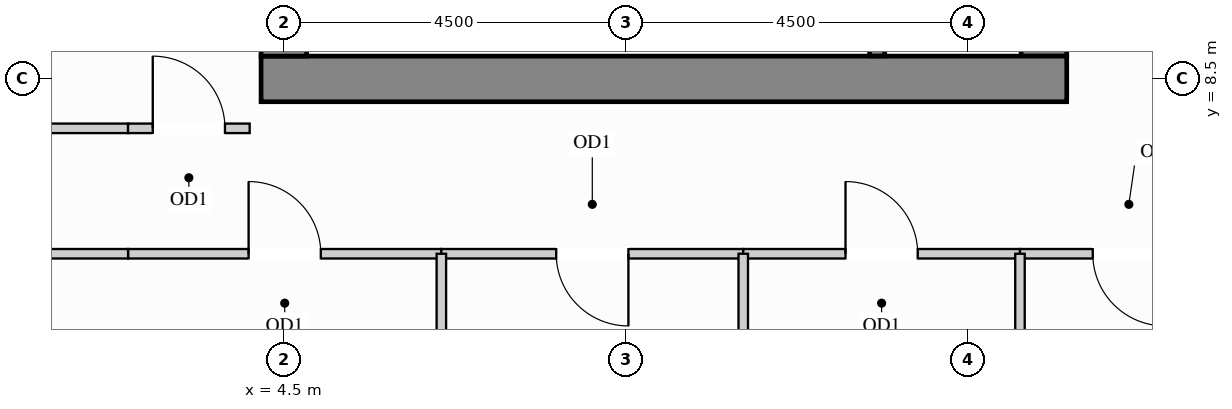
"""IFC4 building model, lengths in metres.
Left out: names, types, materials, properties, quantities, classifications, styles, units other than length and angle.
Written with IfcOpenShell. Run it as: python <this file> out.ifc"""

import sys

from ifc_helpers import new_model, si_unit, direction, frame, frame_2d, origin, place, context, subcontext, project, spatial, rectangle, extrude, source, transform, mapped, element, fill, save


model = new_model("IFC4")
c1 = context("Model", 3, precision=1e-05, world=origin(), true_north=direction((0.0, 1.0)))
c2 = subcontext(c1, "Body", "Model", "MODEL_VIEW")
j1 = project(units=[si_unit("LENGTHUNIT", "METRE"), si_unit("PLANEANGLEUNIT", "RADIAN")], contexts=[c1])
p1 = place(None, origin())
s1 = spatial("IfcSite", under=j1, at=p1, CompositionType="ELEMENT")
p2 = place(p1, origin())
s2 = spatial("IfcBuilding", under=s1, at=p2, CompositionType="ELEMENT")
p3 = place(p2, frame((0.0, 0.0, 200.7)))
s3 = spatial("IfcBuildingStorey", under=s2, at=p3, CompositionType="ELEMENT", Elevation=200.7)
m1 = source(origin(), c2, "Body", "SweptSolid", [
    extrude(rectangle(XDim=10.02, YDim=0.6, at=frame_2d((5.01, 0.0))), origin(), (0.0, 0.0, 1.0), 3.4),
])
p4 = place(p3, frame((14.5, 8.8, 0.0), z_axis=(0.0, 0.0, 1.0), x_axis=(0.0, 1.0, 0.0)))
e1 = element("IfcWall", 1, at=p4, inside=s3, PredefinedType="SHEAR", context=c2, shape_type="MappedRepresentation", body=[
    mapped(m1, transform((0.0, 0.0, 0.0), x_axis=(1.0, 0.0, 0.0), y_axis=(0.0, 1.0, 0.0), z_axis=(0.0, 0.0, 1.0))),
])
m2 = source(origin(), c2, "Body", "SweptSolid", [
    extrude(rectangle(XDim=10.6, YDim=0.6, at=frame_2d((5.3, 0.0))), origin(), (0.0, 0.0, 1.0), 3.4),
])
p5 = place(p3, frame((4.2, 8.5, 0.0), z_axis=(0.0, 0.0, 1.0), x_axis=(1.0, 0.0, 0.0)))
e2 = element("IfcWall", 2, at=p5, inside=s3, PredefinedType="SHEAR", context=c2, shape_type="MappedRepresentation", body=[
    mapped(m2, transform((0.0, 0.0, 0.0), x_axis=(1.0, 0.0, 0.0), y_axis=(0.0, 1.0, 0.0), z_axis=(0.0, 0.0, 1.0))),
])
m3 = source(origin(), c2, "Body", "SweptSolid", [
    extrude(rectangle(XDim=20.4, YDim=0.6, at=frame_2d((10.2, 0.0))), origin(), (0.0, 0.0, 1.0), 3.4),
])
p6 = place(p3, frame((4.5, 8.8, 0.0), z_axis=(0.0, 0.0, 1.0), x_axis=(0.0, 1.0, 0.0)))
e3 = element("IfcWall", 3, at=p6, inside=s3, PredefinedType="SHEAR", context=c2, shape_type="MappedRepresentation", body=[
    mapped(m3, transform((0.0, 0.0, 0.0), x_axis=(1.0, 0.0, 0.0), y_axis=(0.0, 1.0, 0.0), z_axis=(0.0, 0.0, 1.0))),
])
m4 = source(origin(), c2, "Body", "SweptSolid", [
    extrude(rectangle(XDim=2.098, YDim=0.125, at=frame_2d((1.049, 0.0))), origin(), (0.0, 0.0, 1.0), 3.385),
])
p7 = place(p3, frame((0.352, 7.85, 0.0), z_axis=(0.0, 0.0, 1.0), x_axis=(1.0, 0.0, 0.0)))
e4 = element("IfcWall", 4, at=p7, inside=s3, PredefinedType="PARTITIONING", context=c2, shape_type="MappedRepresentation", body=[
    mapped(m4, transform((0.0, 0.0, 0.0), x_axis=(1.0, 0.0, 0.0), y_axis=(0.0, 1.0, 0.0), z_axis=(0.0, 0.0, 1.0))),
])
p8 = place(p3, frame((2.45, 7.85, 0.0), z_axis=(0.0, 0.0, 1.0), x_axis=(1.0, 0.0, 0.0)))
e5 = element("IfcWall", 5, at=p8, inside=s3, PredefinedType="PARTITIONING", context=c2, shape_type="SweptSolid", body=[
    extrude(rectangle(XDim=1.6, YDim=0.125, at=frame_2d((0.8, 0.0))), origin(), (0.0, 0.0, 1.0), 3.385),
])
p9 = place(p8, frame((0.325, 0.0, 0.0)))
e6 = element("IfcOpeningElement", 6, at=p9, cuts=e5, PredefinedType="OPENING", context=c2, shape_type="SweptSolid", body=[
    extrude(rectangle(XDim=0.95, YDim=2.15, at=frame_2d((0.475, 1.075))), frame((0.0, 0.073, 0.0), z_axis=(0.0, -1.0, 0.0), x_axis=(1.0, 0.0, 0.0)), (0.0, 0.0, 1.0), 0.145),
])
p10 = place(p3, frame((2.45, 6.2, 0.0), z_axis=(0.0, 0.0, 1.0), x_axis=(1.0, 0.0, 0.0)))
e7 = element("IfcWall", 7, at=p10, inside=s3, PredefinedType="PARTITIONING", context=c2, shape_type="SweptSolid", body=[
    extrude(rectangle(XDim=4.122, YDim=0.125, at=frame_2d((2.061, 0.0))), origin(), (0.0, 0.0, 1.0), 2.848),
])
p11 = place(p10, frame((1.586, 0.0, 0.0)))
e8 = element("IfcOpeningElement", 8, at=p11, cuts=e7, PredefinedType="OPENING", context=c2, shape_type="SweptSolid", body=[
    extrude(rectangle(XDim=0.95, YDim=2.15, at=frame_2d((0.475, 1.075))), frame((0.0, 0.073, 0.0), z_axis=(0.0, -1.0, 0.0), x_axis=(1.0, 0.0, 0.0)), (0.0, 0.0, 1.0), 0.145),
])
p12 = place(p3, frame((6.572, 6.2, 0.0), z_axis=(0.0, 0.0, 1.0), x_axis=(1.0, 0.0, 0.0)))
e9 = element("IfcWall", 9, at=p12, inside=s3, PredefinedType="PARTITIONING", context=c2, shape_type="SweptSolid", body=[
    extrude(rectangle(XDim=3.972, YDim=0.125, at=frame_2d((1.986, 0.0))), origin(), (0.0, 0.0, 1.0), 2.848),
])
p13 = place(p12, frame((1.511, 0.0, 0.0)))
e10 = element("IfcOpeningElement", 10, at=p13, cuts=e9, PredefinedType="OPENING", context=c2, shape_type="SweptSolid", body=[
    extrude(rectangle(XDim=0.95, YDim=2.15, at=frame_2d((0.475, 1.075))), frame((0.0, 0.073, 0.0), z_axis=(0.0, -1.0, 0.0), x_axis=(1.0, 0.0, 0.0)), (0.0, 0.0, 1.0), 0.145),
])
p14 = place(p3, frame((10.544, 6.2, 0.0), z_axis=(0.0, 0.0, 1.0), x_axis=(1.0, 0.0, 0.0)))
e11 = element("IfcWall", 11, at=p14, inside=s3, PredefinedType="PARTITIONING", context=c2, shape_type="SweptSolid", body=[
    extrude(rectangle(XDim=3.641, YDim=0.125, at=frame_2d((1.821, 0.0))), origin(), (0.0, 0.0, 1.0), 2.848),
])
p15 = place(p14, frame((1.345, 0.0, 0.0)))
e12 = element("IfcOpeningElement", 12, at=p15, cuts=e11, PredefinedType="OPENING", context=c2, shape_type="SweptSolid", body=[
    extrude(rectangle(XDim=0.95, YDim=2.15, at=frame_2d((0.475, 1.075))), frame((0.0, 0.073, 0.0), z_axis=(0.0, -1.0, 0.0), x_axis=(1.0, 0.0, 0.0)), (0.0, 0.0, 1.0), 0.145),
])
p16 = place(p3, frame((14.185, 6.2, 0.0), z_axis=(0.0, 0.0, 1.0), x_axis=(1.0, 0.0, 0.0)))
e13 = element("IfcWall", 13, at=p16, inside=s3, PredefinedType="PARTITIONING", context=c2, shape_type="SweptSolid", body=[
    extrude(rectangle(XDim=2.865, YDim=0.125, at=frame_2d((1.433, 0.0))), origin(), (0.0, 0.0, 1.0), 2.848),
])
p17 = place(p16, frame((0.958, 0.0, 0.0)))
e14 = element("IfcOpeningElement", 14, at=p17, cuts=e13, PredefinedType="OPENING", context=c2, shape_type="SweptSolid", body=[
    extrude(rectangle(XDim=0.95, YDim=2.15, at=frame_2d((0.475, 1.075))), frame((0.0, 0.073, 0.0), z_axis=(0.0, -1.0, 0.0), x_axis=(1.0, 0.0, 0.0)), (0.0, 0.0, 1.0), 0.145),
])
m5 = source(origin(), c2, "Body", "SweptSolid", [
    extrude(rectangle(XDim=2.098, YDim=0.125, at=frame_2d((1.049, 0.0))), origin(), (0.0, 0.0, 1.0), 2.848),
])
p18 = place(p3, frame((0.352, 6.2, 0.0), z_axis=(0.0, 0.0, 1.0), x_axis=(1.0, 0.0, 0.0)))
e15 = element("IfcWall", 15, at=p18, inside=s3, PredefinedType="PARTITIONING", context=c2, shape_type="MappedRepresentation", body=[
    mapped(m5, transform((0.0, 0.0, 0.0), x_axis=(1.0, 0.0, 0.0), y_axis=(0.0, 1.0, 0.0), z_axis=(0.0, 0.0, 1.0))),
])
m6 = source(origin(), c2, "Body", "SweptSolid", [
    extrude(rectangle(XDim=5.848, YDim=0.125, at=frame_2d((2.924, 0.0))), origin(), (0.0, 0.0, 1.0), 3.385),
])
for number, where, z_axis, x_axis in (
    (16, (6.572, 0.352, 0.0), (0.0, 0.0, 1.0), (0.0, 1.0, 0.0)),
    (17, (10.544, 0.352, 0.0), (0.0, 0.0, 1.0), (0.0, 1.0, 0.0)),
):
    element("IfcWall", number, at=place(p3, frame(where, z_axis=z_axis, x_axis=x_axis)), inside=s3, PredefinedType="PARTITIONING", context=c2, shape_type="MappedRepresentation", body=[
        mapped(m6, transform((0.0, 0.0, 0.0), x_axis=(1.0, 0.0, 0.0), y_axis=(0.0, 1.0, 0.0), z_axis=(0.0, 0.0, 1.0))),
    ])
m7 = source(origin(), c2, "Body", "SweptSolid", [
    extrude(rectangle(XDim=5.08, YDim=0.125, at=frame_2d((2.54, 0.0))), origin(), (0.0, 0.0, 1.0), 3.385),
])
p19 = place(p3, frame((14.185, 1.12, 0.0), z_axis=(0.0, 0.0, 1.0), x_axis=(0.0, 1.0, 0.0)))
e18 = element("IfcWall", 18, at=p19, inside=s3, PredefinedType="PARTITIONING", context=c2, shape_type="MappedRepresentation", body=[
    mapped(m7, transform((0.0, 0.0, 0.0), x_axis=(1.0, 0.0, 0.0), y_axis=(0.0, 1.0, 0.0), z_axis=(0.0, 0.0, 1.0))),
])
m8 = source(origin(), c2, "Body", "SweptSolid", [
    extrude(rectangle(XDim=3.753, YDim=0.2, at=frame_2d((1.876, 0.0))), origin(), (0.0, 0.0, 1.0), 3.4),
])
p20 = place(p3, frame((12.305, 8.802, 0.0), z_axis=(0.0, 0.0, 1.0), x_axis=(0.0, 1.0, 0.0)))
e19 = element("IfcWall", 19, at=p20, inside=s3, PredefinedType="SHEAR", context=c2, shape_type="MappedRepresentation", body=[
    mapped(m8, transform((0.0, 0.0, 0.0), x_axis=(1.0, 0.0, 0.0), y_axis=(0.0, 1.0, 0.0), z_axis=(0.0, 0.0, 1.0))),
])
m9 = source(origin(), c2, "Body", "SweptSolid", [
    extrude(rectangle(XDim=0.95, YDim=2.15, at=frame_2d((0.475, 1.075))), frame((0.0, 0.025, 0.0), z_axis=(0.0, -1.0, 0.0), x_axis=(1.0, 0.0, 0.0)), (0.0, 0.0, 1.0), 0.05),
])
p21 = place(p11, origin())
e20 = element("IfcDoor", 20, at=p21, inside=s3, OperationType="SINGLE_SWING_LEFT", PredefinedType="DOOR", context=c2, shape_type="MappedRepresentation", body=[
    mapped(m9, transform((0.0, 0.0, 0.0), x_axis=(1.0, 0.0, 0.0), y_axis=(0.0, 1.0, 0.0), z_axis=(0.0, 0.0, 1.0))),
])
fill(e8, e20)
p22 = place(p13, origin())
e21 = element("IfcDoor", 21, at=p22, inside=s3, OperationType="SINGLE_SWING_RIGHT", PredefinedType="DOOR", context=c2, shape_type="MappedRepresentation", body=[
    mapped(m9, transform((0.0, 0.0, 0.0), x_axis=(1.0, 0.0, 0.0), y_axis=(0.0, 1.0, 0.0), z_axis=(0.0, 0.0, 1.0))),
])
fill(e10, e21)
p23 = place(p15, origin())
e22 = element("IfcDoor", 22, at=p23, inside=s3, OperationType="SINGLE_SWING_LEFT", PredefinedType="DOOR", context=c2, shape_type="MappedRepresentation", body=[
    mapped(m9, transform((0.0, 0.0, 0.0), x_axis=(1.0, 0.0, 0.0), y_axis=(0.0, 1.0, 0.0), z_axis=(0.0, 0.0, 1.0))),
])
fill(e12, e22)
p24 = place(p17, origin())
e23 = element("IfcDoor", 23, at=p24, inside=s3, OperationType="SINGLE_SWING_RIGHT", PredefinedType="DOOR", context=c2, shape_type="MappedRepresentation", body=[
    mapped(m9, transform((0.0, 0.0, 0.0), x_axis=(1.0, 0.0, 0.0), y_axis=(0.0, 1.0, 0.0), z_axis=(0.0, 0.0, 1.0))),
])
fill(e14, e23)
p25 = place(p9, origin())
e24 = element("IfcDoor", 24, at=p25, inside=s3, OperationType="SINGLE_SWING_LEFT", PredefinedType="DOOR", context=c2, shape_type="MappedRepresentation", body=[
    mapped(m9, transform((0.0, 0.0, 0.0), x_axis=(1.0, 0.0, 0.0), y_axis=(0.0, 1.0, 0.0), z_axis=(0.0, 0.0, 1.0))),
])
fill(e6, e24)
save(model, sys.argv[1])
